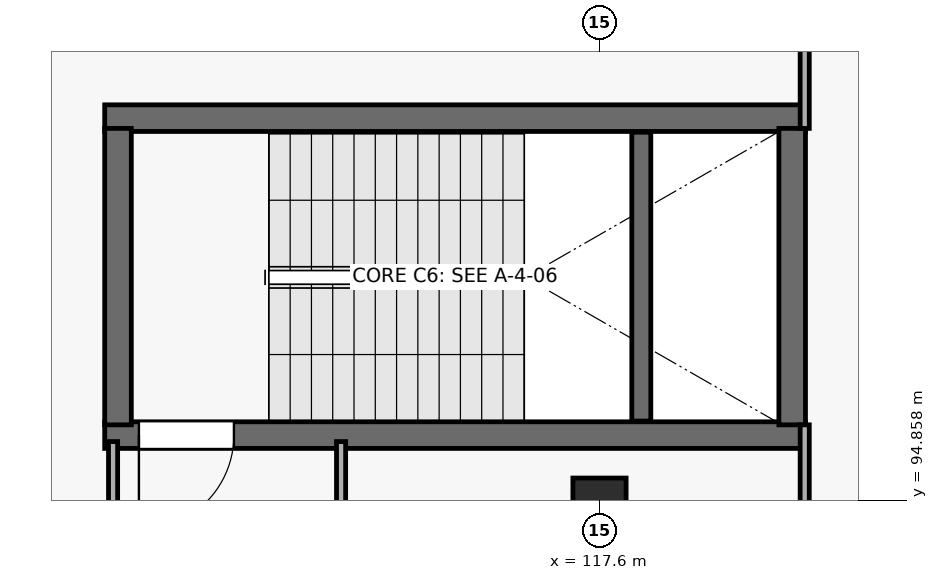
"""IFC4 building model, lengths in metres.
Left out: names, types, materials, properties, quantities, classifications, styles, units other than length and angle.
Written with IfcOpenShell. Run it as: python <this file> out.ifc"""

import sys

from ifc_helpers import new_model, si_unit, direction, frame, frame_2d, origin, origin_2d, place, context, subcontext, project, spatial, rectangle, extrude, element, fill, save


model = new_model("IFC4")
c1 = context("Model", 3, precision=1e-05, world=origin(), true_north=direction((0.0, 1.0)))
c2 = subcontext(c1, "Body", "Model", "MODEL_VIEW")
j1 = project(units=[si_unit("LENGTHUNIT", "METRE"), si_unit("PLANEANGLEUNIT", "RADIAN")], contexts=[c1])
p1 = place(None, origin())
s1 = spatial("IfcSite", under=j1, at=p1, CompositionType="ELEMENT")
p2 = place(p1, origin())
s2 = spatial("IfcBuilding", under=s1, at=p2, CompositionType="ELEMENT")
p3 = place(p2, frame((0.0, 0.0, 5.4)))
s3 = spatial("IfcBuildingStorey", under=s2, at=p3, CompositionType="ELEMENT", Elevation=5.4)
p4 = place(p3, frame((117.6, 94.8, 0.0), z_axis=(0.0, 0.0, 1.0), x_axis=(1.0, 0.0, 0.0)))
e1 = element("IfcColumn", 1, at=p4, inside=s3, PredefinedType="COLUMN", context=c2, shape_type="SweptSolid", body=[
    extrude(rectangle(XDim=0.7, YDim=0.7, at=origin_2d()), origin(), (0.0, 0.0, 1.0), 4.8),
])
p5 = place(p3, frame((111.09, 95.715, 0.0), z_axis=(0.0, 0.0, 1.0), x_axis=(1.0, 0.0, 0.0)))
e2 = element("IfcWall", 2, at=p5, inside=s3, PredefinedType="SHEAR", context=c2, shape_type="SweptSolid", body=[
    extrude(rectangle(XDim=9.22, YDim=0.35, at=frame_2d((4.61, 0.0))), origin(), (0.0, 0.0, 1.0), 4.52),
])
p6 = place(p5, frame((0.45, 0.0, 0.0)))
e3 = element("IfcOpeningElement", 3, at=p6, cuts=e2, PredefinedType="OPENING", context=c2, shape_type="SweptSolid", body=[
    extrude(rectangle(XDim=1.25, YDim=2.2, at=frame_2d((0.625, 1.1))), frame((0.0, 0.185, 0.0), z_axis=(0.0, -1.0, 0.0), x_axis=(1.0, 0.0, 0.0)), (0.0, 0.0, 1.0), 0.37),
])
p7 = place(p3, frame((120.31, 99.885, 0.0), z_axis=(0.0, 0.0, 1.0), x_axis=(-1.0, 0.0, 0.0)))
e4 = element("IfcWall", 4, at=p7, inside=s3, PredefinedType="SHEAR", context=c2, shape_type="SweptSolid", body=[
    extrude(rectangle(XDim=9.22, YDim=0.35, at=frame_2d((4.61, 0.0))), origin(), (0.0, 0.0, 1.0), 4.52),
])
for number, where, z_axis, x_axis in (
    (5, (111.265, 95.85, 0.0), (0.0, 0.0, 1.0), (0.0, 1.0, 0.0)),
    (6, (120.135, 99.75, 0.0), (0.0, 0.0, 1.0), (0.0, -1.0, 0.0)),
):
    element("IfcWall", number, at=place(p3, frame(where, z_axis=z_axis, x_axis=x_axis)), inside=s3, PredefinedType="SHEAR", context=c2, shape_type="SweptSolid", body=[
        extrude(rectangle(XDim=3.9, YDim=0.35, at=frame_2d((1.95, 0.0))), origin(), (0.0, 0.0, 1.0), 4.52),
    ])
p8 = place(p3, frame((118.15, 95.9, 0.0), z_axis=(0.0, 0.0, 1.0), x_axis=(0.0, 1.0, 0.0)))
e7 = element("IfcWall", 7, at=p8, inside=s3, PredefinedType="SHEAR", context=c2, shape_type="SweptSolid", body=[
    extrude(rectangle(XDim=3.8, YDim=0.25, at=frame_2d((1.9, 0.0))), origin(), (0.0, 0.0, 1.0), 2.22),
])
p9 = place(p3, frame((120.3, 109.5, 0.0), z_axis=(0.0, 0.0, 1.0), x_axis=(0.0, -1.0, 0.0)))
e8 = element("IfcWall", 8, at=p9, inside=s3, PredefinedType="PARTITIONING", context=c2, shape_type="SweptSolid", body=[
    extrude(rectangle(XDim=9.75, YDim=0.12, at=frame_2d((4.875, 0.0))), origin(), (0.0, 0.0, 1.0), 4.52),
])
p10 = place(p3, frame((120.3, 95.85, 0.0), z_axis=(0.0, 0.0, 1.0), x_axis=(0.0, -1.0, 0.0)))
e9 = element("IfcWall", 9, at=p10, inside=s3, PredefinedType="PARTITIONING", context=c2, shape_type="SweptSolid", body=[
    extrude(rectangle(XDim=1.75, YDim=0.12, at=frame_2d((0.875, 0.0))), origin(), (0.0, 0.0, 1.0), 4.52),
])
for number, where, z_axis, x_axis in (
    (10, (114.2, 94.24, 0.0), (0.0, 0.0, 1.0), (0.0, 1.0, 0.0)),
    (11, (111.2, 95.63, 0.0), (0.0, 0.0, 1.0), (0.0, -1.0, 0.0)),
):
    element("IfcWall", number, at=place(p3, frame(where, z_axis=z_axis, x_axis=x_axis)), inside=s3, PredefinedType="PARTITIONING", context=c2, shape_type="SweptSolid", body=[
        extrude(rectangle(XDim=1.39, YDim=0.12, at=frame_2d((0.695, 0.0))), origin(), (0.0, 0.0, 1.0), 4.52),
    ])
p11 = place(p6, origin())
e12 = element("IfcDoor", 12, at=p11, inside=s3, OperationType="SINGLE_SWING_RIGHT", PredefinedType="DOOR", context=c2, shape_type="SweptSolid", body=[
    extrude(rectangle(XDim=1.25, YDim=2.2, at=frame_2d((0.625, 1.1))), frame((0.0, 0.025, 0.0), z_axis=(0.0, -1.0, 0.0), x_axis=(1.0, 0.0, 0.0)), (0.0, 0.0, 1.0), 0.05),
])
fill(e3, e12)
save(model, sys.argv[1])
